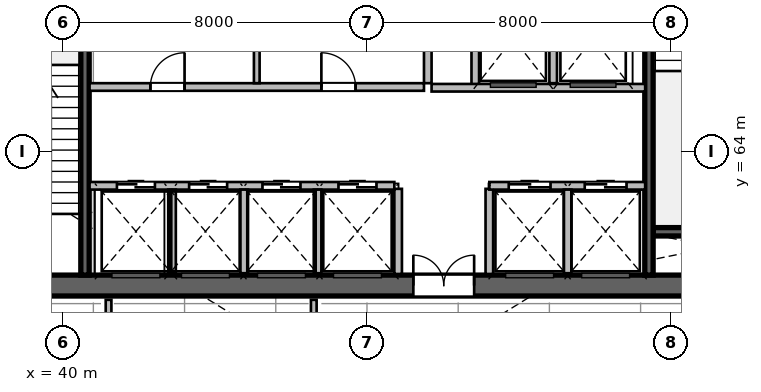
"""IFC4 building model, lengths in metres.
Left out: names, types, materials, properties, quantities, classifications, styles, units other than length and angle.
Written with IfcOpenShell. Run it as: python <this file> out.ifc"""

import sys

from ifc_helpers import new_model, si_unit, direction, frame, frame_2d, origin, place, context, subcontext, project, spatial, rectangle, extrude, source, transform, mapped, element, fill, save


model = new_model("IFC4")
c1 = context("Model", 3, precision=1e-05, world=origin(), true_north=direction((0.0, 1.0)))
c2 = subcontext(c1, "Body", "Model", "MODEL_VIEW")
j1 = project(units=[si_unit("LENGTHUNIT", "METRE"), si_unit("PLANEANGLEUNIT", "RADIAN")], contexts=[c1])
p1 = place(None, origin())
s1 = spatial("IfcSite", under=j1, at=p1, CompositionType="ELEMENT")
p2 = place(p1, origin())
s2 = spatial("IfcBuilding", under=s1, at=p2, CompositionType="ELEMENT")
p3 = place(p2, frame((0.0, 0.0, 30.0)))
s3 = spatial("IfcBuildingStorey", under=s2, at=p3, CompositionType="ELEMENT", Elevation=30.0)
m1 = source(origin(), c2, "Body", "SweptSolid", [
    extrude(rectangle(XDim=21.6, YDim=0.55, at=frame_2d((10.8, 0.0))), origin(), (0.0, 0.0, 1.0), 5.4),
])
p4 = place(p3, frame((37.2, 60.475, 0.0), z_axis=(0.0, 0.0, 1.0), x_axis=(1.0, 0.0, 0.0)))
e1 = element("IfcWall", 1, at=p4, inside=s3, PredefinedType="SHEAR", context=c2, shape_type="MappedRepresentation", body=[
    mapped(m1, transform((0.0, 0.0, 0.0), scale=1.0)),
])
p5 = place(p4, frame((1.1, 0.0, 0.0)))
e2 = element("IfcOpeningElement", 2, at=p5, cuts=e1, PredefinedType="OPENING", context=c2, shape_type="SweptSolid", body=[
    extrude(rectangle(XDim=1.15, YDim=2.15, at=frame_2d((0.575, 1.075))), frame((0.0, 0.285, 0.0), z_axis=(0.0, -1.0, 0.0), x_axis=(1.0, 0.0, 0.0)), (0.0, 0.0, 1.0), 0.57),
])
p6 = place(p4, frame((19.5, 0.0, 0.0)))
e3 = element("IfcOpeningElement", 3, at=p6, cuts=e1, PredefinedType="OPENING", context=c2, shape_type="SweptSolid", body=[
    extrude(rectangle(XDim=0.9, YDim=2.1, at=frame_2d((0.45, 1.05))), frame((0.0, 0.285, 0.0), z_axis=(0.0, -1.0, 0.0), x_axis=(1.0, 0.0, 0.0)), (0.0, 0.0, 1.0), 0.57),
])
p7 = place(p4, frame((12.02, 0.0, 0.0)))
e4 = element("IfcOpeningElement", 4, at=p7, cuts=e1, PredefinedType="OPENING", context=c2, shape_type="SweptSolid", body=[
    extrude(rectangle(XDim=1.6, YDim=2.15, at=frame_2d((0.8, 1.075))), frame((0.0, 0.285, 0.0), z_axis=(0.0, -1.0, 0.0), x_axis=(1.0, 0.0, 0.0)), (0.0, 0.0, 1.0), 0.57),
])
m2 = source(origin(), c2, "Body", "SweptSolid", [
    extrude(rectangle(XDim=3.27, YDim=0.22, at=frame_2d((1.635, 0.0))), origin(), (0.0, 0.0, 1.0), 5.4),
])
p8 = place(p3, frame((55.53, 61.89, 0.0), z_axis=(0.0, 0.0, 1.0), x_axis=(1.0, 0.0, 0.0)))
e5 = element("IfcWall", 5, at=p8, inside=s3, PredefinedType="SHEAR", context=c2, shape_type="MappedRepresentation", body=[
    mapped(m2, transform((0.0, 0.0, 0.0), scale=1.0)),
])
m3 = source(origin(), c2, "Body", "SweptSolid", [
    extrude(rectangle(XDim=10.9, YDim=0.22, at=frame_2d((5.45, 0.0))), origin(), (0.0, 0.0, 1.0), 5.4),
])
p9 = place(p3, frame((40.58, 60.75, 0.0), z_axis=(0.0, 0.0, 1.0), x_axis=(0.0, 1.0, 0.0)))
e6 = element("IfcWall", 6, at=p9, inside=s3, PredefinedType="SHEAR", context=c2, shape_type="MappedRepresentation", body=[
    mapped(m3, transform((0.0, 0.0, 0.0), scale=1.0)),
])
p10 = place(p3, frame((55.42, 60.75, 0.0), z_axis=(0.0, 0.0, 1.0), x_axis=(0.0, 1.0, 0.0)))
e7 = element("IfcWall", 7, at=p10, inside=s3, PredefinedType="SHEAR", context=c2, shape_type="MappedRepresentation", body=[
    mapped(m3, transform((0.0, 0.0, 0.0), scale=1.0)),
])
p11 = place(p10, frame((9.495, 0.0, 0.0)))
e8 = element("IfcOpeningElement", 8, at=p11, cuts=e7, PredefinedType="OPENING", context=c2, shape_type="SweptSolid", body=[
    extrude(rectangle(XDim=1.15, YDim=2.15, at=frame_2d((0.575, 1.075))), frame((0.0, 0.12, 0.0), z_axis=(0.0, -1.0, 0.0), x_axis=(1.0, 0.0, 0.0)), (0.0, 0.0, 1.0), 0.24),
])
m4 = source(origin(), c2, "Body", "SweptSolid", [
    extrude(rectangle(XDim=2.24, YDim=0.2, at=frame_2d((1.12, 0.0))), origin(), (0.0, 0.0, 1.0), 5.16),
])
for number, where, z_axis, x_axis in (
    (9, (48.82, 60.78, 0.0), (0.0, 0.0, 1.0), (0.0, 1.0, 0.0)),
    (10, (51.22, 60.78, 0.0), (0.0, 0.0, 1.0), (0.0, 1.0, 0.0)),
):
    element("IfcWall", number, at=place(p3, frame(where, z_axis=z_axis, x_axis=x_axis)), inside=s3, PredefinedType="SOLIDWALL", context=c2, shape_type="MappedRepresentation", body=[
        mapped(m4, transform((0.0, 0.0, 0.0), scale=1.0)),
    ])
m5 = source(origin(), c2, "Body", "SweptSolid", [
    extrude(rectangle(XDim=5.8, YDim=0.2, at=frame_2d((2.9, 0.0))), origin(), (0.0, 0.0, 1.0), 5.16),
])
p12 = place(p3, frame((49.6, 65.8, 0.0), z_axis=(0.0, 0.0, 1.0), x_axis=(0.0, 1.0, 0.0)))
e11 = element("IfcWall", 11, at=p12, inside=s3, PredefinedType="SOLIDWALL", context=c2, shape_type="MappedRepresentation", body=[
    mapped(m5, transform((0.0, 0.0, 0.0), scale=1.0)),
])
m6 = source(origin(), c2, "Body", "SweptSolid", [
    extrude(rectangle(XDim=2.58, YDim=0.2, at=frame_2d((1.29, 0.0))), origin(), (0.0, 0.0, 1.0), 5.16),
])
p13 = place(p3, frame((50.85, 65.68, 0.0), z_axis=(0.0, 0.0, 1.0), x_axis=(0.0, 1.0, 0.0)))
e12 = element("IfcWall", 12, at=p13, inside=s3, PredefinedType="SOLIDWALL", context=c2, shape_type="MappedRepresentation", body=[
    mapped(m6, transform((0.0, 0.0, 0.0), scale=1.0)),
])
m7 = source(origin(), c2, "Body", "SweptSolid", [
    extrude(rectangle(XDim=2.4, YDim=0.2, at=frame_2d((1.2, 0.0))), origin(), (0.0, 0.0, 1.0), 5.16),
])
p14 = place(p3, frame((52.9, 65.8, 0.0), z_axis=(0.0, 0.0, 1.0), x_axis=(0.0, 1.0, 0.0)))
e13 = element("IfcWall", 13, at=p14, inside=s3, PredefinedType="SOLIDWALL", context=c2, shape_type="MappedRepresentation", body=[
    mapped(m7, transform((0.0, 0.0, 0.0), scale=1.0)),
])
m8 = source(origin(), c2, "Body", "SweptSolid", [
    extrude(rectangle(XDim=5.62, YDim=0.2, at=frame_2d((2.81, 0.0))), origin(), (0.0, 0.0, 1.0), 5.16),
])
p15 = place(p3, frame((49.7, 65.68, 0.0), z_axis=(0.0, 0.0, 1.0), x_axis=(1.0, 0.0, 0.0)))
e14 = element("IfcWall", 14, at=p15, inside=s3, PredefinedType="SOLIDWALL", context=c2, shape_type="MappedRepresentation", body=[
    mapped(m8, transform((0.0, 0.0, 0.0), scale=1.0)),
])
m9 = source(origin(), c2, "Body", "SweptSolid", [
    extrude(rectangle(XDim=8.02, YDim=0.2, at=frame_2d((4.01, 0.0))), origin(), (0.0, 0.0, 1.0), 5.16),
])
p16 = place(p3, frame((40.7, 63.1, 0.0), z_axis=(0.0, 0.0, 1.0), x_axis=(1.0, 0.0, 0.0)))
e15 = element("IfcWall", 15, at=p16, inside=s3, PredefinedType="SOLIDWALL", context=c2, shape_type="MappedRepresentation", body=[
    mapped(m9, transform((0.0, 0.0, 0.0), scale=1.0)),
])
p17 = place(p16, frame((0.72, 0.0, 0.0)))
e16 = element("IfcOpeningElement", 16, at=p17, cuts=e15, PredefinedType="OPENING", context=c2, shape_type="SweptSolid", body=[
    extrude(rectangle(XDim=1.0, YDim=2.15, at=frame_2d((0.5, 1.075))), frame((0.0, 0.11, 0.0), z_axis=(0.0, -1.0, 0.0), x_axis=(1.0, 0.0, 0.0)), (0.0, 0.0, 1.0), 0.22),
])
p18 = place(p16, frame((2.62, 0.0, 0.0)))
e17 = element("IfcOpeningElement", 17, at=p18, cuts=e15, PredefinedType="OPENING", context=c2, shape_type="SweptSolid", body=[
    extrude(rectangle(XDim=1.0, YDim=2.15, at=frame_2d((0.5, 1.075))), frame((0.0, 0.11, 0.0), z_axis=(0.0, -1.0, 0.0), x_axis=(1.0, 0.0, 0.0)), (0.0, 0.0, 1.0), 0.22),
])
p19 = place(p16, frame((4.55, 0.0, 0.0)))
e18 = element("IfcOpeningElement", 18, at=p19, cuts=e15, PredefinedType="OPENING", context=c2, shape_type="SweptSolid", body=[
    extrude(rectangle(XDim=1.0, YDim=2.15, at=frame_2d((0.5, 1.075))), frame((0.0, 0.11, 0.0), z_axis=(0.0, -1.0, 0.0), x_axis=(1.0, 0.0, 0.0)), (0.0, 0.0, 1.0), 0.22),
])
p20 = place(p16, frame((6.55, 0.0, 0.0)))
e19 = element("IfcOpeningElement", 19, at=p20, cuts=e15, PredefinedType="OPENING", context=c2, shape_type="SweptSolid", body=[
    extrude(rectangle(XDim=1.0, YDim=2.15, at=frame_2d((0.5, 1.075))), frame((0.0, 0.11, 0.0), z_axis=(0.0, -1.0, 0.0), x_axis=(1.0, 0.0, 0.0)), (0.0, 0.0, 1.0), 0.22),
])
m10 = source(origin(), c2, "Body", "SweptSolid", [
    extrude(rectangle(XDim=4.1, YDim=0.2, at=frame_2d((2.05, 0.0))), origin(), (0.0, 0.0, 1.0), 5.16),
])
p21 = place(p3, frame((51.22, 63.1, 0.0), z_axis=(0.0, 0.0, 1.0), x_axis=(1.0, 0.0, 0.0)))
e20 = element("IfcWall", 20, at=p21, inside=s3, PredefinedType="SOLIDWALL", context=c2, shape_type="MappedRepresentation", body=[
    mapped(m10, transform((0.0, 0.0, 0.0), scale=1.0)),
])
p22 = place(p21, frame((0.51, 0.0, 0.0)))
e21 = element("IfcOpeningElement", 21, at=p22, cuts=e20, PredefinedType="OPENING", context=c2, shape_type="SweptSolid", body=[
    extrude(rectangle(XDim=1.1, YDim=2.15, at=frame_2d((0.55, 1.075))), frame((0.0, 0.11, 0.0), z_axis=(0.0, -1.0, 0.0), x_axis=(1.0, 0.0, 0.0)), (0.0, 0.0, 1.0), 0.22),
])
p23 = place(p21, frame((2.51, 0.0, 0.0)))
e22 = element("IfcOpeningElement", 22, at=p23, cuts=e20, PredefinedType="OPENING", context=c2, shape_type="SweptSolid", body=[
    extrude(rectangle(XDim=1.1, YDim=2.15, at=frame_2d((0.55, 1.075))), frame((0.0, 0.11, 0.0), z_axis=(0.0, -1.0, 0.0), x_axis=(1.0, 0.0, 0.0)), (0.0, 0.0, 1.0), 0.22),
])
m11 = source(origin(), c2, "Body", "SweptSolid", [
    extrude(rectangle(XDim=2.2, YDim=0.2, at=frame_2d((1.1, 0.0))), origin(), (0.0, 0.0, 1.0), 5.16),
])
for number, where, z_axis, x_axis in (
    (23, (42.87, 60.8, 0.0), (0.0, 0.0, 1.0), (0.0, 1.0, 0.0)),
    (24, (44.77, 60.8, 0.0), (0.0, 0.0, 1.0), (0.0, 1.0, 0.0)),
    (25, (46.7, 60.8, 0.0), (0.0, 0.0, 1.0), (0.0, 1.0, 0.0)),
    (26, (53.28, 60.8, 0.0), (0.0, 0.0, 1.0), (0.0, 1.0, 0.0)),
):
    element("IfcWall", number, at=place(p3, frame(where, z_axis=z_axis, x_axis=x_axis)), inside=s3, PredefinedType="SOLIDWALL", context=c2, shape_type="MappedRepresentation", body=[
        mapped(m11, transform((0.0, 0.0, 0.0), scale=1.0)),
    ])
m12 = source(origin(), c2, "Body", "SweptSolid", [
    extrude(rectangle(XDim=8.8, YDim=0.2, at=frame_2d((4.4, 0.0))), origin(), (0.0, 0.0, 1.0), 5.16),
])
p24 = place(p3, frame((40.7, 65.7, 0.0), z_axis=(0.0, 0.0, 1.0), x_axis=(1.0, 0.0, 0.0)))
e27 = element("IfcWall", 27, at=p24, inside=s3, PredefinedType="SOLIDWALL", context=c2, shape_type="MappedRepresentation", body=[
    mapped(m12, transform((0.0, 0.0, 0.0), scale=1.0)),
])
p25 = place(p24, frame((1.6, 0.0, 0.0)))
e28 = element("IfcOpeningElement", 28, at=p25, cuts=e27, PredefinedType="OPENING", context=c2, shape_type="SweptSolid", body=[
    extrude(rectangle(XDim=0.9, YDim=2.1, at=frame_2d((0.45, 1.05))), frame((0.0, 0.11, 0.0), z_axis=(0.0, -1.0, 0.0), x_axis=(1.0, 0.0, 0.0)), (0.0, 0.0, 1.0), 0.22),
])
p26 = place(p24, frame((6.1, 0.0, 0.0)))
e29 = element("IfcOpeningElement", 29, at=p26, cuts=e27, PredefinedType="OPENING", context=c2, shape_type="SweptSolid", body=[
    extrude(rectangle(XDim=0.9, YDim=2.1, at=frame_2d((0.45, 1.05))), frame((0.0, 0.11, 0.0), z_axis=(0.0, -1.0, 0.0), x_axis=(1.0, 0.0, 0.0)), (0.0, 0.0, 1.0), 0.22),
])
m13 = source(origin(), c2, "Body", "SweptSolid", [
    extrude(rectangle(XDim=2.4, YDim=0.15, at=frame_2d((1.2, 0.0))), origin(), (0.0, 0.0, 1.0), 5.16),
])
p27 = place(p3, frame((45.1, 65.8, 0.0), z_axis=(0.0, 0.0, 1.0), x_axis=(0.0, 1.0, 0.0)))
e30 = element("IfcWall", 30, at=p27, inside=s3, PredefinedType="PARTITIONING", context=c2, shape_type="MappedRepresentation", body=[
    mapped(m13, transform((0.0, 0.0, 0.0), scale=1.0)),
])
m14 = source(origin(), c2, "Body", "SweptSolid", [
    extrude(rectangle(XDim=2.033, YDim=0.15, at=frame_2d((1.016, 0.0))), origin(), (0.0, 0.0, 1.0), 5.16),
])
p28 = place(p3, frame((41.2, 58.067, 0.0), z_axis=(0.0, 0.0, 1.0), x_axis=(0.0, 1.0, 0.0)))
e31 = element("IfcWall", 31, at=p28, inside=s3, PredefinedType="PARTITIONING", context=c2, shape_type="MappedRepresentation", body=[
    mapped(m14, transform((0.0, 0.0, 0.0), scale=1.0)),
])
p29 = place(p28, frame((0.591, 0.0, 0.0)))
e32 = element("IfcOpeningElement", 32, at=p29, cuts=e31, PredefinedType="OPENING", context=c2, shape_type="SweptSolid", body=[
    extrude(rectangle(XDim=0.85, YDim=2.1, at=frame_2d((0.425, 1.05))), frame((0.0, 0.085, 0.0), z_axis=(0.0, -1.0, 0.0), x_axis=(1.0, 0.0, 0.0)), (0.0, 0.0, 1.0), 0.17),
])
p30 = place(p3, frame((46.6, 58.067, 0.0), z_axis=(0.0, 0.0, 1.0), x_axis=(0.0, 1.0, 0.0)))
e33 = element("IfcWall", 33, at=p30, inside=s3, PredefinedType="PARTITIONING", context=c2, shape_type="MappedRepresentation", body=[
    mapped(m14, transform((0.0, 0.0, 0.0), scale=1.0)),
])
m15 = source(origin(), c2, "Body", "SweptSolid", [
    extrude(rectangle(XDim=1.6, YDim=2.15, at=frame_2d((0.8, 1.075))), frame((0.0, 0.025, 0.0), z_axis=(0.0, -1.0, 0.0), x_axis=(1.0, 0.0, 0.0)), (0.0, 0.0, 1.0), 0.05),
])
p31 = place(p7, origin())
e34 = element("IfcDoor", 34, at=p31, inside=s3, OperationType="DOUBLE_DOOR_SINGLE_SWING", PredefinedType="DOOR", context=c2, shape_type="MappedRepresentation", body=[
    mapped(m15, transform((0.0, 0.0, 0.0), scale=1.0)),
])
fill(e4, e34)
m16 = source(origin(), c2, "Body", "SweptSolid", [
    extrude(rectangle(XDim=1.0, YDim=2.15, at=frame_2d((0.5, 1.075))), frame((0.0, 0.025, 0.0), z_axis=(0.0, -1.0, 0.0), x_axis=(1.0, 0.0, 0.0)), (0.0, 0.0, 1.0), 0.05),
])
p32 = place(p17, origin())
e35 = element("IfcDoor", 35, at=p32, inside=s3, OperationType="DOUBLE_DOOR_SLIDING", PredefinedType="DOOR", context=c2, shape_type="MappedRepresentation", body=[
    mapped(m16, transform((0.0, 0.0, 0.0), scale=1.0)),
])
fill(e16, e35)
p33 = place(p18, origin())
e36 = element("IfcDoor", 36, at=p33, inside=s3, OperationType="DOUBLE_DOOR_SLIDING", PredefinedType="DOOR", context=c2, shape_type="MappedRepresentation", body=[
    mapped(m16, transform((0.0, 0.0, 0.0), scale=1.0)),
])
fill(e17, e36)
p34 = place(p19, origin())
e37 = element("IfcDoor", 37, at=p34, inside=s3, OperationType="DOUBLE_DOOR_SLIDING", PredefinedType="DOOR", context=c2, shape_type="MappedRepresentation", body=[
    mapped(m16, transform((0.0, 0.0, 0.0), scale=1.0)),
])
fill(e18, e37)
p35 = place(p20, origin())
e38 = element("IfcDoor", 38, at=p35, inside=s3, OperationType="DOUBLE_DOOR_SLIDING", PredefinedType="DOOR", context=c2, shape_type="MappedRepresentation", body=[
    mapped(m16, transform((0.0, 0.0, 0.0), scale=1.0)),
])
fill(e19, e38)
m17 = source(origin(), c2, "Body", "SweptSolid", [
    extrude(rectangle(XDim=1.1, YDim=2.15, at=frame_2d((0.55, 1.075))), frame((0.0, 0.025, 0.0), z_axis=(0.0, -1.0, 0.0), x_axis=(1.0, 0.0, 0.0)), (0.0, 0.0, 1.0), 0.05),
])
p36 = place(p22, origin())
e39 = element("IfcDoor", 39, at=p36, inside=s3, OperationType="DOUBLE_DOOR_SLIDING", PredefinedType="DOOR", context=c2, shape_type="MappedRepresentation", body=[
    mapped(m17, transform((0.0, 0.0, 0.0), scale=1.0)),
])
fill(e21, e39)
p37 = place(p23, origin())
e40 = element("IfcDoor", 40, at=p37, inside=s3, OperationType="DOUBLE_DOOR_SLIDING", PredefinedType="DOOR", context=c2, shape_type="MappedRepresentation", body=[
    mapped(m17, transform((0.0, 0.0, 0.0), scale=1.0)),
])
fill(e22, e40)
m18 = source(origin(), c2, "Body", "SweptSolid", [
    extrude(rectangle(XDim=0.9, YDim=2.1, at=frame_2d((0.45, 1.05))), frame((0.0, 0.025, 0.0), z_axis=(0.0, -1.0, 0.0), x_axis=(1.0, 0.0, 0.0)), (0.0, 0.0, 1.0), 0.05),
])
p38 = place(p25, origin())
e41 = element("IfcDoor", 41, at=p38, inside=s3, OperationType="SINGLE_SWING_RIGHT", PredefinedType="DOOR", context=c2, shape_type="MappedRepresentation", body=[
    mapped(m18, transform((0.0, 0.0, 0.0), scale=1.0)),
])
fill(e28, e41)
p39 = place(p26, origin())
e42 = element("IfcDoor", 42, at=p39, inside=s3, OperationType="SINGLE_SWING_LEFT", PredefinedType="DOOR", context=c2, shape_type="MappedRepresentation", body=[
    mapped(m18, transform((0.0, 0.0, 0.0), scale=1.0)),
])
fill(e29, e42)
save(model, sys.argv[1])
